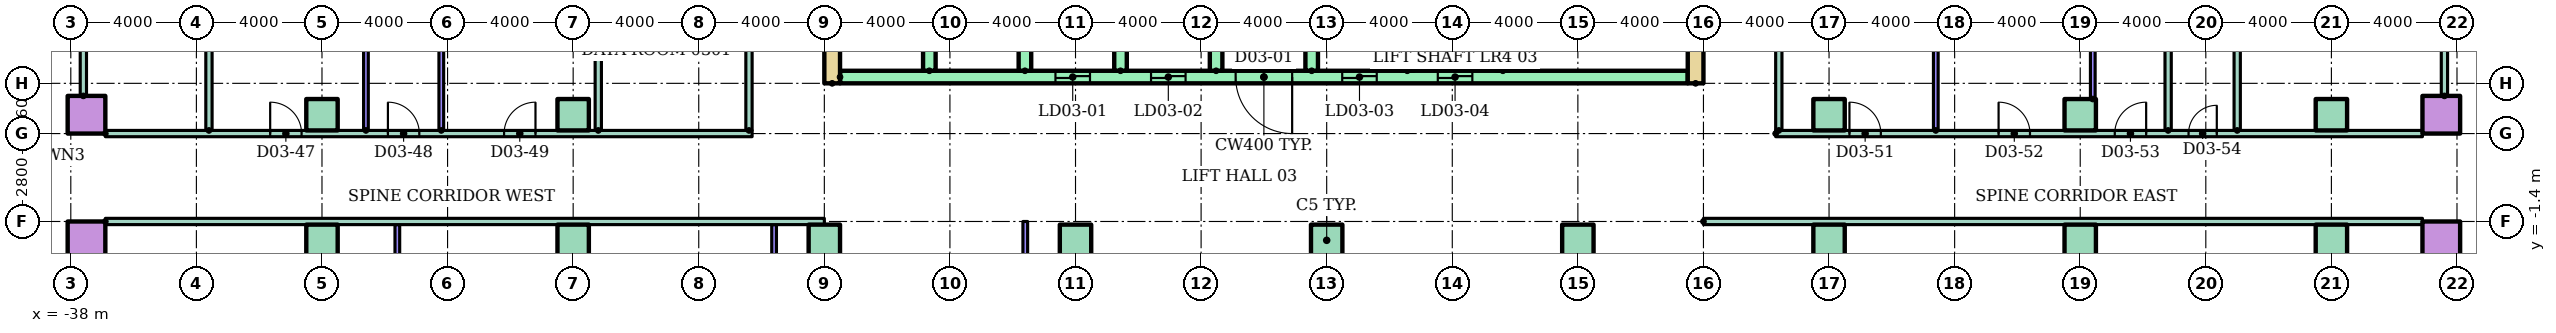
"""IFC4 building model, lengths in metres.
Left out: names, types, materials, properties, quantities, classifications, styles, units other than length and angle.
Written with IfcOpenShell. Run it as: python <this file> out.ifc"""

import sys

from ifc_helpers import new_model, si_unit, direction, frame, frame_2d, origin, origin_2d, place, context, subcontext, project, spatial, rectangle, hollow_rectangle, extrude, element, fill, save


model = new_model("IFC4")
c1 = context("Model", 3, precision=1e-05, world=origin(), true_north=direction((0.0, 1.0)))
c2 = subcontext(c1, "Body", "Model", "MODEL_VIEW")
j1 = project(units=[si_unit("LENGTHUNIT", "METRE"), si_unit("PLANEANGLEUNIT", "RADIAN")], contexts=[c1])
p1 = place(None, origin())
s1 = spatial("IfcSite", under=j1, at=p1, CompositionType="ELEMENT")
p2 = place(p1, origin())
s2 = spatial("IfcBuilding", under=s1, at=p2, CompositionType="ELEMENT")
p3 = place(p2, frame((0.0, 0.0, 14.0)))
s3 = spatial("IfcBuildingStorey", under=s2, at=p3, CompositionType="ELEMENT", Elevation=14.0)
p4 = place(p3, frame((-37.5, -2.0, 0.0)))
e1 = element("IfcColumn", 1, at=p4, inside=s3, PredefinedType="COLUMN", context=c2, shape_type="SweptSolid", body=[
    extrude(hollow_rectangle(XDim=1.2, YDim=1.2, WallThickness=0.06, at=origin_2d()), origin(), (0.0, 0.0, 1.0), 4.0),
])
for number, where in (
    (2, (-30.0, -2.0, 0.0)),
    (3, (-22.0, -2.0, 0.0)),
    (4, (-14.0, -2.0, 0.0)),
    (5, (-6.0, -2.0, 0.0)),
    (6, (2.0, -2.0, 0.0)),
    (7, (10.0, -2.0, 0.0)),
    (8, (18.0, -2.0, 0.0)),
    (9, (26.0, -2.0, 0.0)),
    (10, (34.0, -2.0, 0.0)),
):
    element("IfcColumn", number, at=place(p3, frame(where)), inside=s3, PredefinedType="COLUMN", context=c2, shape_type="SweptSolid", body=[
        extrude(rectangle(XDim=1.0, YDim=1.0, at=origin_2d()), origin(), (0.0, 0.0, 1.0), 4.0),
    ])
for number, where in (
    (11, (37.5, -2.0, 0.0)),
    (12, (-37.5, 2.0, 0.0)),
):
    element("IfcColumn", number, at=place(p3, frame(where)), inside=s3, PredefinedType="COLUMN", context=c2, shape_type="SweptSolid", body=[
        extrude(hollow_rectangle(XDim=1.2, YDim=1.2, WallThickness=0.06, at=origin_2d()), origin(), (0.0, 0.0, 1.0), 4.0),
    ])
for number, where in (
    (13, (-30.0, 2.0, 0.0)),
    (14, (-22.0, 2.0, 0.0)),
    (15, (18.0, 2.0, 0.0)),
    (16, (26.0, 2.0, 0.0)),
    (17, (34.0, 2.0, 0.0)),
):
    element("IfcColumn", number, at=place(p3, frame(where)), inside=s3, PredefinedType="COLUMN", context=c2, shape_type="SweptSolid", body=[
        extrude(rectangle(XDim=1.0, YDim=1.0, at=origin_2d()), origin(), (0.0, 0.0, 1.0), 4.0),
    ])
p5 = place(p3, frame((37.5, 2.0, 0.0)))
e18 = element("IfcColumn", 18, at=p5, inside=s3, PredefinedType="COLUMN", context=c2, shape_type="SweptSolid", body=[
    extrude(hollow_rectangle(XDim=1.2, YDim=1.2, WallThickness=0.06, at=origin_2d()), origin(), (0.0, 0.0, 1.0), 4.0),
])
for number, where, z_axis, x_axis in (
    (19, (-13.75, 3.0, 0.0), (0.0, 0.0, 1.0), (0.0, 1.0, 0.0)),
    (20, (13.75, 3.0, 0.0), (0.0, 0.0, 1.0), (0.0, 1.0, 0.0)),
):
    element("IfcWall", number, at=place(p3, frame(where, z_axis=z_axis, x_axis=x_axis)), inside=s3, PredefinedType="SHEAR", context=c2, shape_type="SweptSolid", body=[
        extrude(rectangle(XDim=17.0, YDim=0.5, at=frame_2d((8.5, 0.0))), origin(), (0.0, 0.0, 1.0), 3.7),
    ])
p6 = place(p3, frame((-13.5, 3.2, 0.0)))
e21 = element("IfcWall", 21, at=p6, inside=s3, PredefinedType="SHEAR", context=c2, shape_type="SweptSolid", body=[
    extrude(rectangle(XDim=27.0, YDim=0.4, at=frame_2d((13.5, 0.0))), origin(), (0.0, 0.0, 1.0), 3.7),
])
p7 = place(p6, frame((6.861, 0.0, 0.0)))
e22 = element("IfcOpeningElement", 22, at=p7, cuts=e21, PredefinedType="OPENING", context=c2, shape_type="SweptSolid", body=[
    extrude(rectangle(XDim=1.1, YDim=2.1, at=frame_2d((0.55, 1.05))), frame((0.0, 0.21, 0.0), z_axis=(0.0, -1.0, 0.0), x_axis=(1.0, 0.0, 0.0)), (0.0, 0.0, 1.0), 0.42),
])
p8 = place(p6, frame((9.906, 0.0, 0.0)))
e23 = element("IfcOpeningElement", 23, at=p8, cuts=e21, PredefinedType="OPENING", context=c2, shape_type="SweptSolid", body=[
    extrude(rectangle(XDim=1.1, YDim=2.1, at=frame_2d((0.55, 1.05))), frame((0.0, 0.21, 0.0), z_axis=(0.0, -1.0, 0.0), x_axis=(1.0, 0.0, 0.0)), (0.0, 0.0, 1.0), 0.42),
])
p9 = place(p6, frame((15.994, 0.0, 0.0)))
e24 = element("IfcOpeningElement", 24, at=p9, cuts=e21, PredefinedType="OPENING", context=c2, shape_type="SweptSolid", body=[
    extrude(rectangle(XDim=1.1, YDim=2.1, at=frame_2d((0.55, 1.05))), frame((0.0, 0.21, 0.0), z_axis=(0.0, -1.0, 0.0), x_axis=(1.0, 0.0, 0.0)), (0.0, 0.0, 1.0), 0.42),
])
p10 = place(p6, frame((19.039, 0.0, 0.0)))
e25 = element("IfcOpeningElement", 25, at=p10, cuts=e21, PredefinedType="OPENING", context=c2, shape_type="SweptSolid", body=[
    extrude(rectangle(XDim=1.1, YDim=2.1, at=frame_2d((0.55, 1.05))), frame((0.0, 0.21, 0.0), z_axis=(0.0, -1.0, 0.0), x_axis=(1.0, 0.0, 0.0)), (0.0, 0.0, 1.0), 0.42),
])
p11 = place(p6, frame((12.6, 0.0, 0.0)))
e26 = element("IfcOpeningElement", 26, at=p11, cuts=e21, PredefinedType="OPENING", context=c2, shape_type="SweptSolid", body=[
    extrude(rectangle(XDim=1.8, YDim=2.1, at=frame_2d((0.9, 1.05))), frame((0.0, 0.21, 0.0), z_axis=(0.0, -1.0, 0.0), x_axis=(1.0, 0.0, 0.0)), (0.0, 0.0, 1.0), 0.42),
])
for number, where, z_axis, x_axis in (
    (27, (-10.656, 3.4, 0.0), (0.0, 0.0, 1.0), (0.0, 1.0, 0.0)),
    (28, (-7.611, 3.4, 0.0), (0.0, 0.0, 1.0), (0.0, 1.0, 0.0)),
    (29, (-4.567, 3.4, 0.0), (0.0, 0.0, 1.0), (0.0, 1.0, 0.0)),
    (30, (-1.522, 3.4, 0.0), (0.0, 0.0, 1.0), (0.0, 1.0, 0.0)),
    (31, (1.522, 3.4, 0.0), (0.0, 0.0, 1.0), (0.0, 1.0, 0.0)),
    (32, (4.567, 3.4, 0.0), (0.0, 0.0, 1.0), (0.0, 1.0, 0.0)),
    (33, (7.611, 3.4, 0.0), (0.0, 0.0, 1.0), (0.0, 1.0, 0.0)),
):
    element("IfcWall", number, at=place(p3, frame(where, z_axis=z_axis, x_axis=x_axis)), inside=s3, PredefinedType="SHEAR", context=c2, shape_type="SweptSolid", body=[
        extrude(rectangle(XDim=3.0, YDim=0.4, at=frame_2d((1.5, 0.0))), origin(), (0.0, 0.0, 1.0), 3.7),
    ])
for number, where in (
    (34, (-36.9, -1.4, 0.0)),
    (35, (14.0, -1.4, 0.0)),
):
    element("IfcWall", number, at=place(p3, frame(where)), inside=s3, PredefinedType="PARTITIONING", context=c2, shape_type="SweptSolid", body=[
        extrude(rectangle(XDim=22.9, YDim=0.2, at=frame_2d((11.45, 0.0))), origin(), (0.0, 0.0, 1.0), 3.7),
    ])
p12 = place(p3, frame((-36.9, 1.4, 0.0)))
e36 = element("IfcWall", 36, at=p12, inside=s3, PredefinedType="PARTITIONING", context=c2, shape_type="SweptSolid", body=[
    extrude(rectangle(XDim=20.6, YDim=0.2, at=frame_2d((10.3, 0.0))), origin(), (0.0, 0.0, 1.0), 3.7),
])
p13 = place(p12, frame((5.25, 0.0, 0.0)))
e37 = element("IfcOpeningElement", 37, at=p13, cuts=e36, PredefinedType="OPENING", context=c2, shape_type="SweptSolid", body=[
    extrude(rectangle(XDim=1.0, YDim=2.1, at=frame_2d((0.5, 1.05))), frame((0.0, 0.11, 0.0), z_axis=(0.0, -1.0, 0.0), x_axis=(1.0, 0.0, 0.0)), (0.0, 0.0, 1.0), 0.22),
])
p14 = place(p12, frame((9.0, 0.0, 0.0)))
e38 = element("IfcOpeningElement", 38, at=p14, cuts=e36, PredefinedType="OPENING", context=c2, shape_type="SweptSolid", body=[
    extrude(rectangle(XDim=1.0, YDim=2.1, at=frame_2d((0.5, 1.05))), frame((0.0, 0.11, 0.0), z_axis=(0.0, -1.0, 0.0), x_axis=(1.0, 0.0, 0.0)), (0.0, 0.0, 1.0), 0.22),
])
p15 = place(p12, frame((12.7, 0.0, 0.0)))
e39 = element("IfcOpeningElement", 39, at=p15, cuts=e36, PredefinedType="OPENING", context=c2, shape_type="SweptSolid", body=[
    extrude(rectangle(XDim=1.0, YDim=2.1, at=frame_2d((0.5, 1.05))), frame((0.0, 0.11, 0.0), z_axis=(0.0, -1.0, 0.0), x_axis=(1.0, 0.0, 0.0)), (0.0, 0.0, 1.0), 0.22),
])
p16 = place(p3, frame((16.3, 1.4, 0.0)))
e40 = element("IfcWall", 40, at=p16, inside=s3, PredefinedType="PARTITIONING", context=c2, shape_type="SweptSolid", body=[
    extrude(rectangle(XDim=20.6, YDim=0.2, at=frame_2d((10.3, 0.0))), origin(), (0.0, 0.0, 1.0), 3.7),
])
p17 = place(p16, frame((2.35, 0.0, 0.0)))
e41 = element("IfcOpeningElement", 41, at=p17, cuts=e40, PredefinedType="OPENING", context=c2, shape_type="SweptSolid", body=[
    extrude(rectangle(XDim=1.0, YDim=2.1, at=frame_2d((0.5, 1.05))), frame((0.0, 0.11, 0.0), z_axis=(0.0, -1.0, 0.0), x_axis=(1.0, 0.0, 0.0)), (0.0, 0.0, 1.0), 0.22),
])
p18 = place(p16, frame((7.1, 0.0, 0.0)))
e42 = element("IfcOpeningElement", 42, at=p18, cuts=e40, PredefinedType="OPENING", context=c2, shape_type="SweptSolid", body=[
    extrude(rectangle(XDim=1.0, YDim=2.1, at=frame_2d((0.5, 1.05))), frame((0.0, 0.11, 0.0), z_axis=(0.0, -1.0, 0.0), x_axis=(1.0, 0.0, 0.0)), (0.0, 0.0, 1.0), 0.22),
])
p19 = place(p16, frame((10.8, 0.0, 0.0)))
e43 = element("IfcOpeningElement", 43, at=p19, cuts=e40, PredefinedType="OPENING", context=c2, shape_type="SweptSolid", body=[
    extrude(rectangle(XDim=1.0, YDim=2.1, at=frame_2d((0.5, 1.05))), frame((0.0, 0.11, 0.0), z_axis=(0.0, -1.0, 0.0), x_axis=(1.0, 0.0, 0.0)), (0.0, 0.0, 1.0), 0.22),
])
p20 = place(p16, frame((13.15, 0.0, 0.0)))
e44 = element("IfcOpeningElement", 44, at=p20, cuts=e40, PredefinedType="OPENING", context=c2, shape_type="SweptSolid", body=[
    extrude(rectangle(XDim=0.9, YDim=2.1, at=frame_2d((0.45, 1.05))), frame((0.0, 0.11, 0.0), z_axis=(0.0, -1.0, 0.0), x_axis=(1.0, 0.0, 0.0)), (0.0, 0.0, 1.0), 0.22),
])
p21 = place(p3, frame((-37.6, 2.6, 0.0), z_axis=(0.0, 0.0, 1.0), x_axis=(0.0, 1.0, 0.0)))
e45 = element("IfcWall", 45, at=p21, inside=s3, PredefinedType="PARTITIONING", context=c2, shape_type="SweptSolid", body=[
    extrude(rectangle(XDim=5.9, YDim=0.2, at=frame_2d((2.95, 0.0))), origin(), (0.0, 0.0, 1.0), 3.7),
])
p22 = place(p21, frame((1.95, 0.0, 0.0)))
e46 = element("IfcOpeningElement", 46, at=p22, cuts=e45, PredefinedType="OPENING", context=c2, shape_type="SweptSolid", body=[
    extrude(rectangle(XDim=0.9, YDim=2.1, at=frame_2d((0.45, 1.05))), frame((0.0, 0.11, 0.0), z_axis=(0.0, -1.0, 0.0), x_axis=(1.0, 0.0, 0.0)), (0.0, 0.0, 1.0), 0.22),
])
p23 = place(p3, frame((-33.6, 1.5, 0.0), z_axis=(0.0, 0.0, 1.0), x_axis=(0.0, 1.0, 0.0)))
e47 = element("IfcWall", 47, at=p23, inside=s3, PredefinedType="PARTITIONING", context=c2, shape_type="SweptSolid", body=[
    extrude(rectangle(XDim=7.0, YDim=0.2, at=frame_2d((3.5, 0.0))), origin(), (0.0, 0.0, 1.0), 3.7),
])
p24 = place(p3, frame((-28.6, 1.5, 0.0), z_axis=(0.0, 0.0, 1.0), x_axis=(0.0, 1.0, 0.0)))
e48 = element("IfcWall", 48, at=p24, inside=s3, PredefinedType="PARTITIONING", context=c2, shape_type="SweptSolid", body=[
    extrude(rectangle(XDim=7.0, YDim=0.15, at=frame_2d((3.5, 0.0))), origin(), (0.0, 0.0, 1.0), 3.7),
])
p25 = place(p3, frame((-27.6, -6.25, 0.0), z_axis=(0.0, 0.0, 1.0), x_axis=(0.0, 1.0, 0.0)))
e49 = element("IfcWall", 49, at=p25, inside=s3, PredefinedType="PARTITIONING", context=c2, shape_type="SweptSolid", body=[
    extrude(rectangle(XDim=4.75, YDim=0.15, at=frame_2d((2.375, 0.0))), origin(), (0.0, 0.0, 1.0), 3.7),
])
p26 = place(p3, frame((-26.2, 1.5, 0.0), z_axis=(0.0, 0.0, 1.0), x_axis=(0.0, 1.0, 0.0)))
e50 = element("IfcWall", 50, at=p26, inside=s3, PredefinedType="PARTITIONING", context=c2, shape_type="SweptSolid", body=[
    extrude(rectangle(XDim=7.0, YDim=0.15, at=frame_2d((3.5, 0.0))), origin(), (0.0, 0.0, 1.0), 3.7),
])
p27 = place(p3, frame((-21.2, 1.5, 0.0), z_axis=(0.0, 0.0, 1.0), x_axis=(0.0, 1.0, 0.0)))
e51 = element("IfcWall", 51, at=p27, inside=s3, PredefinedType="PARTITIONING", context=c2, shape_type="SweptSolid", body=[
    extrude(rectangle(XDim=7.0, YDim=0.2, at=frame_2d((3.5, 0.0))), origin(), (0.0, 0.0, 1.0), 3.7),
])
p28 = place(p3, frame((-16.4, 1.5, 0.0), z_axis=(0.0, 0.0, 1.0), x_axis=(0.0, 1.0, 0.0)))
e52 = element("IfcWall", 52, at=p28, inside=s3, PredefinedType="PARTITIONING", context=c2, shape_type="SweptSolid", body=[
    extrude(rectangle(XDim=7.0, YDim=0.2, at=frame_2d((3.5, 0.0))), origin(), (0.0, 0.0, 1.0), 3.7),
])
p29 = place(p28, frame((3.05, 0.0, 0.0)))
e53 = element("IfcOpeningElement", 53, at=p29, cuts=e52, PredefinedType="OPENING", context=c2, shape_type="SweptSolid", body=[
    extrude(rectangle(XDim=0.9, YDim=2.1, at=frame_2d((0.45, 1.05))), frame((0.0, 0.11, 0.0), z_axis=(0.0, -1.0, 0.0), x_axis=(1.0, 0.0, 0.0)), (0.0, 0.0, 1.0), 0.22),
])
p30 = place(p3, frame((-15.6, -6.25, 0.0), z_axis=(0.0, 0.0, 1.0), x_axis=(0.0, 1.0, 0.0)))
e54 = element("IfcWall", 54, at=p30, inside=s3, PredefinedType="PARTITIONING", context=c2, shape_type="SweptSolid", body=[
    extrude(rectangle(XDim=4.75, YDim=0.15, at=frame_2d((2.375, 0.0))), origin(), (0.0, 0.0, 1.0), 3.7),
])
p31 = place(p3, frame((-7.6, -6.25, 0.0), z_axis=(0.0, 0.0, 1.0), x_axis=(0.0, 1.0, 0.0)))
e55 = element("IfcWall", 55, at=p31, inside=s3, PredefinedType="PARTITIONING", context=c2, shape_type="SweptSolid", body=[
    extrude(rectangle(XDim=4.85, YDim=0.15, at=frame_2d((2.425, 0.0))), origin(), (0.0, 0.0, 1.0), 3.7),
])
p32 = place(p3, frame((16.4, 1.5, 0.0), z_axis=(0.0, 0.0, 1.0), x_axis=(0.0, 1.0, 0.0)))
e56 = element("IfcWall", 56, at=p32, inside=s3, PredefinedType="PARTITIONING", context=c2, shape_type="SweptSolid", body=[
    extrude(rectangle(XDim=7.0, YDim=0.2, at=frame_2d((3.5, 0.0))), origin(), (0.0, 0.0, 1.0), 3.7),
])
p33 = place(p3, frame((21.4, 1.5, 0.0), z_axis=(0.0, 0.0, 1.0), x_axis=(0.0, 1.0, 0.0)))
e57 = element("IfcWall", 57, at=p33, inside=s3, PredefinedType="PARTITIONING", context=c2, shape_type="SweptSolid", body=[
    extrude(rectangle(XDim=7.0, YDim=0.15, at=frame_2d((3.5, 0.0))), origin(), (0.0, 0.0, 1.0), 3.7),
])
p34 = place(p3, frame((26.4, 2.5, 0.0), z_axis=(0.0, 0.0, 1.0), x_axis=(0.0, 1.0, 0.0)))
e58 = element("IfcWall", 58, at=p34, inside=s3, PredefinedType="PARTITIONING", context=c2, shape_type="SweptSolid", body=[
    extrude(rectangle(XDim=6.0, YDim=0.15, at=frame_2d((3.0, 0.0))), origin(), (0.0, 0.0, 1.0), 3.7),
])
for number, where, z_axis, x_axis in (
    (59, (28.8, 1.5, 0.0), (0.0, 0.0, 1.0), (0.0, 1.0, 0.0)),
    (60, (31.0, 1.5, 0.0), (0.0, 0.0, 1.0), (0.0, 1.0, 0.0)),
):
    element("IfcWall", number, at=place(p3, frame(where, z_axis=z_axis, x_axis=x_axis)), inside=s3, PredefinedType="PARTITIONING", context=c2, shape_type="SweptSolid", body=[
        extrude(rectangle(XDim=7.0, YDim=0.2, at=frame_2d((3.5, 0.0))), origin(), (0.0, 0.0, 1.0), 3.7),
    ])
p35 = place(p3, frame((37.6, 2.6, 0.0), z_axis=(0.0, 0.0, 1.0), x_axis=(0.0, 1.0, 0.0)))
e61 = element("IfcWall", 61, at=p35, inside=s3, PredefinedType="PARTITIONING", context=c2, shape_type="SweptSolid", body=[
    extrude(rectangle(XDim=5.9, YDim=0.2, at=frame_2d((2.95, 0.0))), origin(), (0.0, 0.0, 1.0), 3.7),
])
p36 = place(p35, frame((1.9, 0.0, 0.0)))
e62 = element("IfcOpeningElement", 62, at=p36, cuts=e61, PredefinedType="OPENING", context=c2, shape_type="SweptSolid", body=[
    extrude(rectangle(XDim=1.0, YDim=2.1, at=frame_2d((0.5, 1.05))), frame((0.0, 0.11, 0.0), z_axis=(0.0, -1.0, 0.0), x_axis=(1.0, 0.0, 0.0)), (0.0, 0.0, 1.0), 0.22),
])
p37 = place(p7, origin())
e63 = element("IfcDoor", 63, at=p37, inside=s3, OperationType="SLIDING_TO_LEFT", PredefinedType="DOOR", context=c2, shape_type="SweptSolid", body=[
    extrude(rectangle(XDim=1.1, YDim=2.1, at=frame_2d((0.55, 1.05))), frame((0.0, 0.025, 0.0), z_axis=(0.0, -1.0, 0.0), x_axis=(1.0, 0.0, 0.0)), (0.0, 0.0, 1.0), 0.05),
])
fill(e22, e63)
p38 = place(p8, origin())
e64 = element("IfcDoor", 64, at=p38, inside=s3, OperationType="SLIDING_TO_LEFT", PredefinedType="DOOR", context=c2, shape_type="SweptSolid", body=[
    extrude(rectangle(XDim=1.1, YDim=2.1, at=frame_2d((0.55, 1.05))), frame((0.0, 0.025, 0.0), z_axis=(0.0, -1.0, 0.0), x_axis=(1.0, 0.0, 0.0)), (0.0, 0.0, 1.0), 0.05),
])
fill(e23, e64)
p39 = place(p9, origin())
e65 = element("IfcDoor", 65, at=p39, inside=s3, OperationType="SLIDING_TO_LEFT", PredefinedType="DOOR", context=c2, shape_type="SweptSolid", body=[
    extrude(rectangle(XDim=1.1, YDim=2.1, at=frame_2d((0.55, 1.05))), frame((0.0, 0.025, 0.0), z_axis=(0.0, -1.0, 0.0), x_axis=(1.0, 0.0, 0.0)), (0.0, 0.0, 1.0), 0.05),
])
fill(e24, e65)
p40 = place(p10, origin())
e66 = element("IfcDoor", 66, at=p40, inside=s3, OperationType="SLIDING_TO_LEFT", PredefinedType="DOOR", context=c2, shape_type="SweptSolid", body=[
    extrude(rectangle(XDim=1.1, YDim=2.1, at=frame_2d((0.55, 1.05))), frame((0.0, 0.025, 0.0), z_axis=(0.0, -1.0, 0.0), x_axis=(1.0, 0.0, 0.0)), (0.0, 0.0, 1.0), 0.05),
])
fill(e25, e66)
p41 = place(p11, frame((1.8, 0.0, 0.0), z_axis=(0.0, 0.0, 1.0), x_axis=(-1.0, 0.0, 0.0)))
e67 = element("IfcDoor", 67, at=p41, inside=s3, OperationType="DOUBLE_DOOR_SINGLE_SWING", PredefinedType="DOOR", context=c2, shape_type="SweptSolid", body=[
    extrude(rectangle(XDim=1.8, YDim=2.1, at=frame_2d((0.9, 1.05))), frame((0.0, 0.025, 0.0), z_axis=(0.0, -1.0, 0.0), x_axis=(1.0, 0.0, 0.0)), (0.0, 0.0, 1.0), 0.05),
])
fill(e26, e67)
p42 = place(p13, origin())
e68 = element("IfcDoor", 68, at=p42, inside=s3, OperationType="SINGLE_SWING_LEFT", PredefinedType="DOOR", context=c2, shape_type="SweptSolid", body=[
    extrude(rectangle(XDim=1.0, YDim=2.1, at=frame_2d((0.5, 1.05))), frame((0.0, 0.025, 0.0), z_axis=(0.0, -1.0, 0.0), x_axis=(1.0, 0.0, 0.0)), (0.0, 0.0, 1.0), 0.05),
])
fill(e37, e68)
p43 = place(p14, origin())
e69 = element("IfcDoor", 69, at=p43, inside=s3, OperationType="SINGLE_SWING_LEFT", PredefinedType="DOOR", context=c2, shape_type="SweptSolid", body=[
    extrude(rectangle(XDim=1.0, YDim=2.1, at=frame_2d((0.5, 1.05))), frame((0.0, 0.025, 0.0), z_axis=(0.0, -1.0, 0.0), x_axis=(1.0, 0.0, 0.0)), (0.0, 0.0, 1.0), 0.05),
])
fill(e38, e69)
p44 = place(p15, origin())
e70 = element("IfcDoor", 70, at=p44, inside=s3, OperationType="SINGLE_SWING_RIGHT", PredefinedType="DOOR", context=c2, shape_type="SweptSolid", body=[
    extrude(rectangle(XDim=1.0, YDim=2.1, at=frame_2d((0.5, 1.05))), frame((0.0, 0.025, 0.0), z_axis=(0.0, -1.0, 0.0), x_axis=(1.0, 0.0, 0.0)), (0.0, 0.0, 1.0), 0.05),
])
fill(e39, e70)
p45 = place(p17, origin())
e71 = element("IfcDoor", 71, at=p45, inside=s3, OperationType="SINGLE_SWING_LEFT", PredefinedType="DOOR", context=c2, shape_type="SweptSolid", body=[
    extrude(rectangle(XDim=1.0, YDim=2.1, at=frame_2d((0.5, 1.05))), frame((0.0, 0.025, 0.0), z_axis=(0.0, -1.0, 0.0), x_axis=(1.0, 0.0, 0.0)), (0.0, 0.0, 1.0), 0.05),
])
fill(e41, e71)
p46 = place(p18, origin())
e72 = element("IfcDoor", 72, at=p46, inside=s3, OperationType="SINGLE_SWING_LEFT", PredefinedType="DOOR", context=c2, shape_type="SweptSolid", body=[
    extrude(rectangle(XDim=1.0, YDim=2.1, at=frame_2d((0.5, 1.05))), frame((0.0, 0.025, 0.0), z_axis=(0.0, -1.0, 0.0), x_axis=(1.0, 0.0, 0.0)), (0.0, 0.0, 1.0), 0.05),
])
fill(e42, e72)
p47 = place(p19, origin())
e73 = element("IfcDoor", 73, at=p47, inside=s3, OperationType="SINGLE_SWING_RIGHT", PredefinedType="DOOR", context=c2, shape_type="SweptSolid", body=[
    extrude(rectangle(XDim=1.0, YDim=2.1, at=frame_2d((0.5, 1.05))), frame((0.0, 0.025, 0.0), z_axis=(0.0, -1.0, 0.0), x_axis=(1.0, 0.0, 0.0)), (0.0, 0.0, 1.0), 0.05),
])
fill(e43, e73)
p48 = place(p20, origin())
e74 = element("IfcDoor", 74, at=p48, inside=s3, OperationType="SINGLE_SWING_RIGHT", PredefinedType="DOOR", context=c2, shape_type="SweptSolid", body=[
    extrude(rectangle(XDim=0.9, YDim=2.1, at=frame_2d((0.45, 1.05))), frame((0.0, 0.025, 0.0), z_axis=(0.0, -1.0, 0.0), x_axis=(1.0, 0.0, 0.0)), (0.0, 0.0, 1.0), 0.05),
])
fill(e44, e74)
save(model, sys.argv[1])
